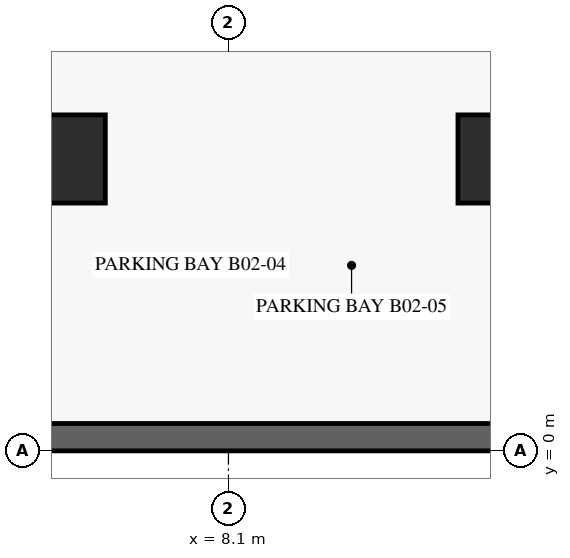
"""IFC4 building model, lengths in metres.
Left out: names, types, materials, properties, quantities, classifications, styles, units other than length and angle.
Written with IfcOpenShell. Run it as: python <this file> out.ifc"""

import sys

from ifc_helpers import new_model, si_unit, direction, frame, frame_2d, origin, origin_2d, place, context, subcontext, project, spatial, rectangle, extrude, source, transform, mapped, element, save


model = new_model("IFC4")
c1 = context("Model", 3, precision=1e-05, world=origin(), true_north=direction((0.0, 1.0)))
c2 = subcontext(c1, "Body", "Model", "MODEL_VIEW")
j1 = project(units=[si_unit("LENGTHUNIT", "METRE"), si_unit("PLANEANGLEUNIT", "RADIAN")], contexts=[c1])
p1 = place(None, origin())
s1 = spatial("IfcSite", under=j1, at=p1, CompositionType="ELEMENT")
p2 = place(p1, origin())
s2 = spatial("IfcBuilding", under=s1, at=p2, CompositionType="ELEMENT")
p3 = place(p2, frame((0.0, 0.0, -7.2)))
s3 = spatial("IfcBuildingStorey", under=s2, at=p3, CompositionType="ELEMENT", Elevation=-7.2)
p4 = place(p3, frame((0.225, 0.225, -0.36), z_axis=(0.0, 0.0, 1.0), x_axis=(1.0, 0.0, 0.0)))
e1 = element("IfcWall", 1, at=p4, inside=s3, PredefinedType="USERDEFINED", context=c2, shape_type="SweptSolid", body=[
    extrude(rectangle(XDim=64.35, YDim=0.45, at=frame_2d((32.175, 0.0))), origin(), (0.0, 0.0, 1.0), 3.598),
])
m1 = source(origin(), c2, "Body", "SweptSolid", [
    extrude(rectangle(XDim=1.45, YDim=1.45, at=origin_2d()), origin(), (0.0, 0.0, 1.0), 3.6),
])
for number, where, z_axis, x_axis in (
    (2, (12.6, 4.8, -0.36), (0.0, 0.0, 1.0), (1.0, 0.0, 0.0)),
    (3, (5.35, 4.8, -0.36), (0.0, 0.0, 1.0), (1.0, 0.0, 0.0)),
):
    element("IfcColumn", number, at=place(p3, frame(where, z_axis=z_axis, x_axis=x_axis)), inside=s3, PredefinedType="COLUMN", context=c2, shape_type="MappedRepresentation", body=[
        mapped(m1, transform((0.0, 0.0, 0.0), scale=1.0)),
    ])
save(model, sys.argv[1])
